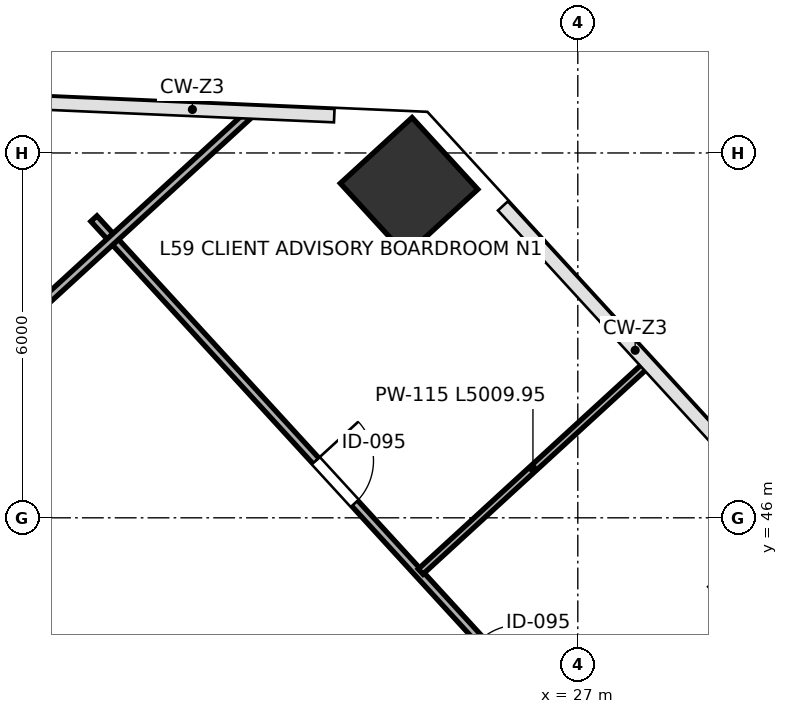
"""IFC4 building model, lengths in metres.
Left out: names, types, materials, properties, quantities, classifications, styles, units other than length and angle.
Written with IfcOpenShell. Run it as: python <this file> out.ifc"""

import sys

from ifc_helpers import new_model, si_unit, direction, frame, frame_2d, origin, origin_2d, place, context, subcontext, project, spatial, rectangle, extrude, source, transform, mapped, element, fill, save


model = new_model("IFC4")
c1 = context("Model", 3, precision=1e-05, world=origin(), true_north=direction((0.0, 1.0)))
c2 = subcontext(c1, "Body", "Model", "MODEL_VIEW")
j1 = project(units=[si_unit("LENGTHUNIT", "METRE"), si_unit("PLANEANGLEUNIT", "RADIAN")], contexts=[c1])
p1 = place(None, origin())
s1 = spatial("IfcSite", under=j1, at=p1, CompositionType="ELEMENT")
p2 = place(p1, origin())
s2 = spatial("IfcBuilding", under=s1, at=p2, CompositionType="ELEMENT")
p3 = place(p2, frame((0.0, 0.0, 262.6)))
s3 = spatial("IfcBuildingStorey", under=s2, at=p3, CompositionType="ELEMENT", Elevation=262.6)
m1 = source(origin(), c2, "Body", "SweptSolid", [
    extrude(rectangle(XDim=1.6, YDim=1.6, at=origin_2d()), origin(), (0.0, 0.0, 1.0), 4.198),
])
p4 = place(p3, frame((24.225, 51.451, 0.001), z_axis=(0.0, 0.0, 1.0), x_axis=(-0.675590207616, 0.73727733681, 0.0)))
e1 = element("IfcColumn", 1, at=p4, inside=s3, PredefinedType="COLUMN", context=c2, shape_type="MappedRepresentation", body=[
    mapped(m1, transform((0.0, 0.0, 0.0), scale=1.0)),
])
p5 = place(p3, frame((19.042, 50.92, 0.0), z_axis=(0.0, 0.0, 1.0), x_axis=(0.675589646996, -0.737277850523, 0.0)))
e2 = element("IfcWall", 2, at=p5, inside=s3, PredefinedType="PARTITIONING", context=c2, shape_type="SweptSolid", body=[
    extrude(rectangle(XDim=21.87, YDim=0.135, at=frame_2d((10.935, 0.0))), origin(), (0.0, 0.0, 1.0), 3.96),
])
p6 = place(p5, frame((5.4, 0.0, 0.0)))
e3 = element("IfcOpeningElement", 3, at=p6, cuts=e2, PredefinedType="OPENING", context=c2, shape_type="SweptSolid", body=[
    extrude(rectangle(XDim=0.95, YDim=2.15, at=frame_2d((0.475, 1.075))), frame((0.0, 0.078, 0.0), z_axis=(0.0, -1.0, 0.0), x_axis=(1.0, 0.0, 0.0)), (0.0, 0.0, 1.0), 0.155),
])
p7 = place(p5, frame((9.4, 0.0, 0.0)))
e4 = element("IfcOpeningElement", 4, at=p7, cuts=e2, PredefinedType="OPENING", context=c2, shape_type="SweptSolid", body=[
    extrude(rectangle(XDim=0.95, YDim=2.15, at=frame_2d((0.475, 1.075))), frame((0.0, 0.078, 0.0), z_axis=(0.0, -1.0, 0.0), x_axis=(1.0, 0.0, 0.0)), (0.0, 0.0, 1.0), 0.155),
])
p8 = place(p3, frame((24.415, 45.115, 0.0), z_axis=(0.0, 0.0, 1.0), x_axis=(0.737279537385, 0.675587806101, 0.0)))
e5 = element("IfcWall", 5, at=p8, inside=s3, PredefinedType="PARTITIONING", context=c2, shape_type="SweptSolid", body=[
    extrude(rectangle(XDim=5.01, YDim=0.115, at=frame_2d((2.505, 0.0))), origin(), (0.0, 0.0, 1.0), 3.295),
])
p9 = place(p3, frame((1.393, 34.124, 0.0), z_axis=(0.0, 0.0, 1.0), x_axis=(0.737274323436, 0.675593496121, 0.0)))
e6 = element("IfcWall", 6, at=p9, inside=s3, PredefinedType="PARTITIONING", context=c2, shape_type="SweptSolid", body=[
    extrude(rectangle(XDim=27.402, YDim=0.135, at=frame_2d((13.701, 0.0))), origin(), (0.0, 0.0, 1.0), 3.96),
])
m2 = source(origin(), c2, "Body", "SweptSolid", [
    extrude(rectangle(XDim=0.95, YDim=2.15, at=frame_2d((0.475, 1.075))), frame((0.0, 0.025, 0.0), z_axis=(0.0, -1.0, 0.0), x_axis=(1.0, 0.0, 0.0)), (0.0, 0.0, 1.0), 0.05),
])
p10 = place(p6, origin())
e7 = element("IfcDoor", 7, at=p10, inside=s3, OperationType="SINGLE_SWING_LEFT", PredefinedType="DOOR", context=c2, shape_type="MappedRepresentation", body=[
    mapped(m2, transform((0.0, 0.0, 0.0), scale=1.0)),
])
fill(e3, e7)
save(model, sys.argv[1])
